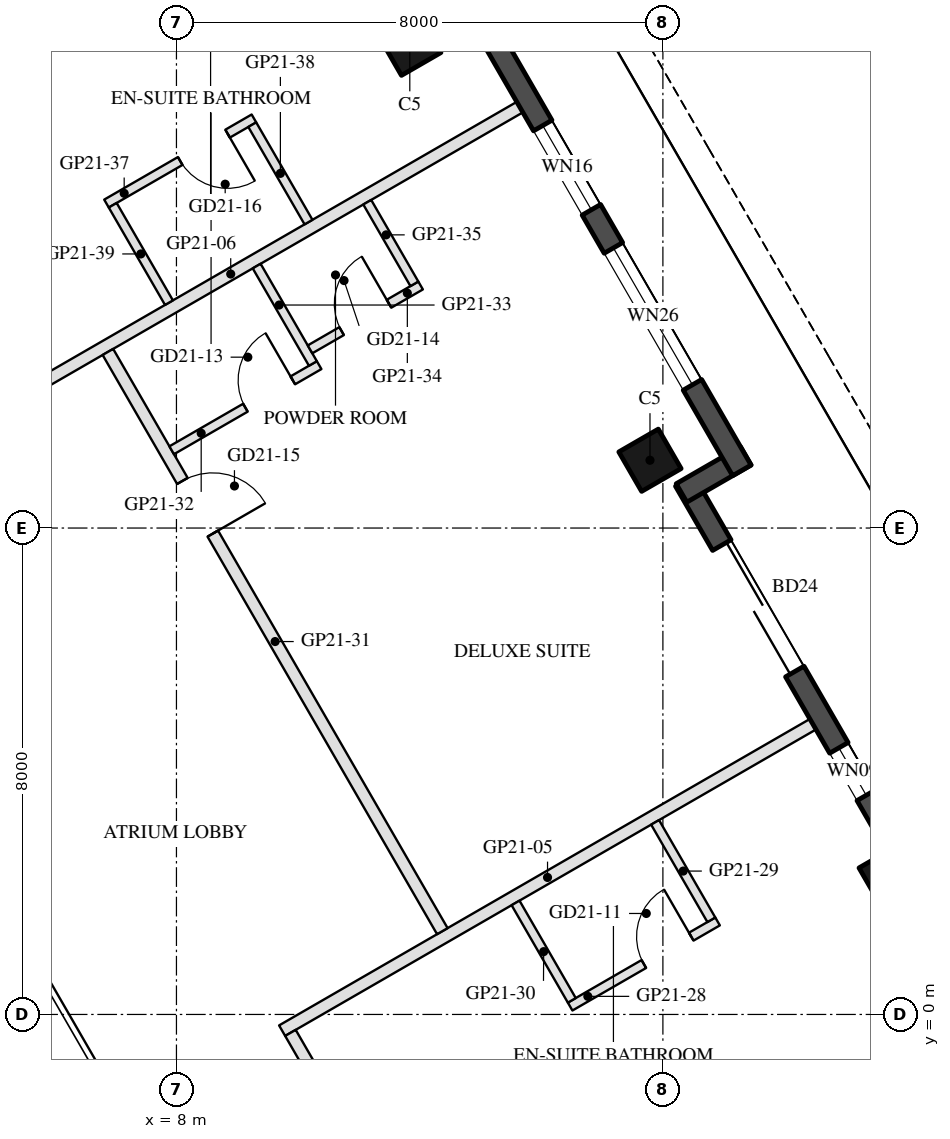
"""IFC4 building model, lengths in metres.
Left out: names, types, materials, properties, quantities, classifications, styles, units other than length and angle.
Written with IfcOpenShell. Run it as: python <this file> out.ifc"""

import sys

from ifc_helpers import new_model, si_unit, direction, frame, frame_2d, origin, origin_2d, place, context, subcontext, project, spatial, rectangle, hollow_rectangle, extrude, element, fill, save


model = new_model("IFC4")
c1 = context("Model", 3, precision=1e-05, world=origin(), true_north=direction((0.0, 1.0)))
c2 = subcontext(c1, "Body", "Model", "MODEL_VIEW")
j1 = project(units=[si_unit("LENGTHUNIT", "METRE"), si_unit("PLANEANGLEUNIT", "RADIAN")], contexts=[c1])
p1 = place(None, origin())
s1 = spatial("IfcSite", under=j1, at=p1, CompositionType="ELEMENT")
p2 = place(p1, origin())
s2 = spatial("IfcBuilding", under=s1, at=p2, CompositionType="ELEMENT")
p3 = place(p2, frame((0.0, 0.0, 220.6)))
s3 = spatial("IfcBuildingStorey", under=s2, at=p3, CompositionType="ELEMENT", Elevation=220.6)
for number, where, z_axis, x_axis in (
    (1, (19.738, 2.273, 0.0), (0.0, 0.0, 1.0), (-0.5, 0.866, 0.0)),
    (2, (15.788, 9.115, 0.0), (0.0, 0.0, 1.0), (-0.5, 0.866, 0.0)),
    (3, (11.838, 15.957, 0.0), (0.0, 0.0, 1.0), (-0.5, 0.866, 0.0)),
):
    element("IfcColumn", number, at=place(p3, frame(where, z_axis=z_axis, x_axis=x_axis)), inside=s3, PredefinedType="COLUMN", context=c2, shape_type="SweptSolid", body=[
        extrude(hollow_rectangle(XDim=0.75, YDim=0.75, WallThickness=0.035, at=origin_2d()), origin(), (0.0, 0.0, 1.0), 3.7),
    ])
p4 = place(p3, frame((19.729, 2.938, 0.0), z_axis=(0.0, 0.0, 1.0), x_axis=(-0.499976430342, 0.866039011305, 0.0)))
e4 = element("IfcWall", 4, at=p4, inside=s3, PredefinedType="SOLIDWALL", context=c2, shape_type="SweptSolid", body=[
    extrude(rectangle(XDim=6.74, YDim=0.35, at=frame_2d((3.37, 0.0))), origin(), (0.0, 0.0, 1.0), 3.55),
])
p5 = place(p4, frame((0.77, 0.0, 0.3)))
e5 = element("IfcOpeningElement", 5, at=p5, cuts=e4, PredefinedType="OPENING", context=c2, shape_type="SweptSolid", body=[
    extrude(rectangle(XDim=0.9, YDim=2.65, at=frame_2d((0.45, 1.325))), frame((0.0, 0.185, 0.0), z_axis=(0.0, -1.0, 0.0), x_axis=(1.0, 0.0, 0.0)), (0.0, 0.0, 1.0), 0.37),
])
p6 = place(p4, frame((3.12, 0.0, 0.0)))
e6 = element("IfcOpeningElement", 6, at=p6, cuts=e4, PredefinedType="OPENING", context=c2, shape_type="SweptSolid", body=[
    extrude(rectangle(XDim=2.4, YDim=2.4, at=frame_2d((1.2, 1.2))), frame((0.0, 0.185, 0.0), z_axis=(0.0, -1.0, 0.0), x_axis=(1.0, 0.0, 0.0)), (0.0, 0.0, 1.0), 0.37),
])
p7 = place(p3, frame((16.306, 8.577, 0.0), z_axis=(0.0, 0.0, 1.0), x_axis=(0.866092288191, 0.499884134912, 0.0)))
e7 = element("IfcWall", 7, at=p7, inside=s3, PredefinedType="SOLIDWALL", context=c2, shape_type="SweptSolid", body=[
    extrude(rectangle(XDim=1.22, YDim=0.35, at=frame_2d((0.61, 0.0))), origin(), (0.0, 0.0, 1.0), 3.55),
])
p8 = place(p3, frame((17.299, 8.948, 0.0), z_axis=(0.0, 0.0, 1.0), x_axis=(-0.500010041276, 0.866019606374, 0.0)))
e8 = element("IfcWall", 8, at=p8, inside=s3, PredefinedType="SOLIDWALL", context=c2, shape_type="SweptSolid", body=[
    extrude(rectangle(XDim=9.7, YDim=0.35, at=frame_2d((4.85, 0.0))), origin(), (0.0, 0.0, 1.0), 3.55),
])
p9 = place(p8, frame((1.625, 0.0, 0.3)))
e9 = element("IfcOpeningElement", 9, at=p9, cuts=e8, PredefinedType="OPENING", context=c2, shape_type="SweptSolid", body=[
    extrude(rectangle(XDim=2.6, YDim=2.65, at=frame_2d((1.3, 1.325))), frame((0.0, 0.185, 0.0), z_axis=(0.0, -1.0, 0.0), x_axis=(1.0, 0.0, 0.0)), (0.0, 0.0, 1.0), 0.37),
])
p10 = place(p8, frame((4.949, 0.0, 0.3)))
e10 = element("IfcOpeningElement", 10, at=p10, cuts=e8, PredefinedType="OPENING", context=c2, shape_type="SweptSolid", body=[
    extrude(rectangle(XDim=1.6, YDim=2.65, at=frame_2d((0.8, 1.325))), frame((0.0, 0.185, 0.0), z_axis=(0.0, -1.0, 0.0), x_axis=(1.0, 0.0, 0.0)), (0.0, 0.0, 1.0), 0.37),
])
p11 = place(p3, frame((18.468, 4.773, 0.0), z_axis=(0.0, 0.0, 1.0), x_axis=(-0.866033125095, -0.499986626058, 0.0)))
e11 = element("IfcWall", 11, at=p11, inside=s3, PredefinedType="PARTITIONING", context=c2, shape_type="SweptSolid", body=[
    extrude(rectangle(XDim=10.08, YDim=0.2, at=frame_2d((5.04, 0.0))), origin(), (0.0, 0.0, 1.0), 3.06),
])
p12 = place(p3, frame((13.647, 14.923, 0.0), z_axis=(0.0, 0.0, 1.0), x_axis=(-0.866027479907, -0.499996404033, 0.0)))
e12 = element("IfcWall", 12, at=p12, inside=s3, PredefinedType="PARTITIONING", context=c2, shape_type="SweptSolid", body=[
    extrude(rectangle(XDim=10.98, YDim=0.2, at=frame_2d((5.49, 0.0))), origin(), (0.0, 0.0, 1.0), 3.06),
])
p13 = place(p3, frame((9.875, -0.303, 0.0), z_axis=(0.0, 0.0, 1.0), x_axis=(0.500026984917, -0.866009823475, 0.0)))
e13 = element("IfcWall", 13, at=p13, inside=s3, PredefinedType="PARTITIONING", context=c2, shape_type="SweptSolid", body=[
    extrude(rectangle(XDim=4.788, YDim=0.2, at=frame_2d((2.394, 0.0))), origin(), (0.0, 0.0, 1.0), 2.95),
])
p14 = place(p13, frame((1.894, 0.0, 0.0)))
e14 = element("IfcOpeningElement", 14, at=p14, cuts=e13, PredefinedType="OPENING", context=c2, shape_type="SweptSolid", body=[
    extrude(rectangle(XDim=1.0, YDim=2.1, at=frame_2d((0.5, 1.05))), frame((0.0, 0.11, 0.0), z_axis=(0.0, -1.0, 0.0), x_axis=(1.0, 0.0, 0.0)), (0.0, 0.0, 1.0), 0.22),
])
p15 = place(p3, frame((14.474, 0.13, 0.0), z_axis=(0.0, 0.0, 1.0), x_axis=(0.866056369097, 0.49994636267, 0.0)))
e15 = element("IfcWall", 15, at=p15, inside=s3, PredefinedType="PARTITIONING", context=c2, shape_type="SweptSolid", body=[
    extrude(rectangle(XDim=2.8, YDim=0.15, at=frame_2d((1.4, 0.0))), origin(), (0.0, 0.0, 1.0), 3.55),
])
p16 = place(p15, frame((1.4, 0.0, 0.0)))
e16 = element("IfcOpeningElement", 16, at=p16, cuts=e15, PredefinedType="OPENING", context=c2, shape_type="SweptSolid", body=[
    extrude(rectangle(XDim=0.9, YDim=2.1, at=frame_2d((0.45, 1.05))), frame((0.0, 0.085, 0.0), z_axis=(0.0, -1.0, 0.0), x_axis=(1.0, 0.0, 0.0)), (0.0, 0.0, 1.0), 0.17),
])
for number, where, z_axis, x_axis in (
    (17, (16.797, 1.557, 0.0), (0.0, 0.0, 1.0), (-0.5, 0.866, 0.0)),
    (18, (14.502, 0.232, 0.0), (0.0, 0.0, 1.0), (-0.5, 0.866, 0.0)),
):
    element("IfcWall", number, at=place(p3, frame(where, z_axis=z_axis, x_axis=x_axis)), inside=s3, PredefinedType="PARTITIONING", context=c2, shape_type="SweptSolid", body=[
        extrude(rectangle(XDim=1.85, YDim=0.15, at=frame_2d((0.925, 0.0))), origin(), (0.0, 0.0, 1.0), 3.55),
    ])
p17 = place(p3, frame((6.873, 10.896, 0.0), z_axis=(0.0, 0.0, 1.0), x_axis=(0.499996545922, -0.866027397988, 0.0)))
e19 = element("IfcWall", 19, at=p17, inside=s3, PredefinedType="PARTITIONING", context=c2, shape_type="SweptSolid", body=[
    extrude(rectangle(XDim=11.0, YDim=0.2, at=frame_2d((5.5, 0.0))), origin(), (0.0, 0.0, 1.0), 2.95),
])
p18 = place(p17, frame((2.45, 0.0, 0.0)))
e20 = element("IfcOpeningElement", 20, at=p18, cuts=e19, PredefinedType="OPENING", context=c2, shape_type="SweptSolid", body=[
    extrude(rectangle(XDim=1.0, YDim=2.1, at=frame_2d((0.5, 1.05))), frame((0.0, 0.11, 0.0), z_axis=(0.0, -1.0, 0.0), x_axis=(1.0, 0.0, 0.0)), (0.0, 0.0, 1.0), 0.22),
])
p19 = place(p3, frame((7.922, 9.279, 0.0), z_axis=(0.0, 0.0, 1.0), x_axis=(0.865996816683, 0.500049511043, 0.0)))
e21 = element("IfcWall", 21, at=p19, inside=s3, PredefinedType="PARTITIONING", context=c2, shape_type="SweptSolid", body=[
    extrude(rectangle(XDim=2.8, YDim=0.15, at=frame_2d((1.4, 0.0))), origin(), (0.0, 0.0, 1.0), 2.95),
])
p20 = place(p19, frame((1.4, 0.0, 0.0)))
e22 = element("IfcOpeningElement", 22, at=p20, cuts=e21, PredefinedType="OPENING", context=c2, shape_type="SweptSolid", body=[
    extrude(rectangle(XDim=0.9, YDim=2.1, at=frame_2d((0.45, 1.05))), frame((0.0, 0.085, 0.0), z_axis=(0.0, -1.0, 0.0), x_axis=(1.0, 0.0, 0.0)), (0.0, 0.0, 1.0), 0.17),
])
p21 = place(p3, frame((10.244, 10.707, 0.0), z_axis=(0.0, 0.0, 1.0), x_axis=(-0.500042316284, 0.866000971088, 0.0)))
e23 = element("IfcWall", 23, at=p21, inside=s3, PredefinedType="PARTITIONING", context=c2, shape_type="SweptSolid", body=[
    extrude(rectangle(XDim=1.85, YDim=0.15, at=frame_2d((0.925, 0.0))), origin(), (0.0, 0.0, 1.0), 3.55),
])
p22 = place(p3, frame((10.197, 10.939, 0.0), z_axis=(0.0, 0.0, 1.0), x_axis=(0.866009402589, 0.500027713859, 0.0)))
e24 = element("IfcWall", 24, at=p22, inside=s3, PredefinedType="PARTITIONING", context=c2, shape_type="SweptSolid", body=[
    extrude(rectangle(XDim=2.1, YDim=0.15, at=frame_2d((1.05, 0.0))), origin(), (0.0, 0.0, 1.0), 3.55),
])
p23 = place(p22, frame((0.6, 0.0, 0.0)))
e25 = element("IfcOpeningElement", 25, at=p23, cuts=e24, PredefinedType="OPENING", context=c2, shape_type="SweptSolid", body=[
    extrude(rectangle(XDim=0.9, YDim=2.1, at=frame_2d((0.45, 1.05))), frame((0.0, 0.085, 0.0), z_axis=(0.0, -1.0, 0.0), x_axis=(1.0, 0.0, 0.0)), (0.0, 0.0, 1.0), 0.17),
])
p24 = place(p3, frame((11.913, 12.016, 0.0), z_axis=(0.0, 0.0, 1.0), x_axis=(-0.499967891604, 0.866043940782, 0.0)))
e26 = element("IfcWall", 26, at=p24, inside=s3, PredefinedType="PARTITIONING", context=c2, shape_type="SweptSolid", body=[
    extrude(rectangle(XDim=1.55, YDim=0.15, at=frame_2d((0.775, 0.0))), origin(), (0.0, 0.0, 1.0), 3.55),
])
p25 = place(p3, frame((9.274, 14.737, 0.0), z_axis=(0.0, 0.0, 1.0), x_axis=(-0.866018616679, -0.500011755427, 0.0)))
e27 = element("IfcWall", 27, at=p25, inside=s3, PredefinedType="PARTITIONING", context=c2, shape_type="SweptSolid", body=[
    extrude(rectangle(XDim=2.8, YDim=0.15, at=frame_2d((1.4, 0.0))), origin(), (0.0, 0.0, 1.0), 3.55),
])
p26 = place(p25, frame((0.5, 0.0, 0.0)))
e28 = element("IfcOpeningElement", 28, at=p26, cuts=e27, PredefinedType="OPENING", context=c2, shape_type="SweptSolid", body=[
    extrude(rectangle(XDim=0.9, YDim=2.1, at=frame_2d((0.45, 1.05))), frame((0.0, 0.085, 0.0), z_axis=(0.0, -1.0, 0.0), x_axis=(1.0, 0.0, 0.0)), (0.0, 0.0, 1.0), 0.17),
])
p27 = place(p3, frame((10.172, 13.032, 0.0), z_axis=(0.0, 0.0, 1.0), x_axis=(-0.500042316284, 0.866000971088, 0.0)))
e29 = element("IfcWall", 29, at=p27, inside=s3, PredefinedType="PARTITIONING", context=c2, shape_type="SweptSolid", body=[
    extrude(rectangle(XDim=1.85, YDim=0.15, at=frame_2d((0.925, 0.0))), origin(), (0.0, 0.0, 1.0), 2.95),
])
p28 = place(p3, frame((7.877, 11.707, 0.0), z_axis=(0.0, 0.0, 1.0), x_axis=(-0.499985172903, 0.866033964044, 0.0)))
e30 = element("IfcWall", 30, at=p28, inside=s3, PredefinedType="PARTITIONING", context=c2, shape_type="SweptSolid", body=[
    extrude(rectangle(XDim=1.85, YDim=0.15, at=frame_2d((0.925, 0.0))), origin(), (0.0, 0.0, 1.0), 2.95),
])
p29 = place(p5, origin())
e31 = element("IfcWindow", 31, at=p29, inside=s3, PartitioningType="SINGLE_PANEL", PredefinedType="WINDOW", context=c2, shape_type="SweptSolid", body=[
    extrude(rectangle(XDim=0.9, YDim=2.65, at=frame_2d((0.45, 1.325))), frame((0.0, 0.03, 0.0), z_axis=(0.0, -1.0, 0.0), x_axis=(1.0, 0.0, 0.0)), (0.0, 0.0, 1.0), 0.06),
])
fill(e5, e31)
p30 = place(p6, frame((2.4, 0.0, 0.0), z_axis=(0.0, 0.0, 1.0), x_axis=(-1.0, 0.0, 0.0)))
e32 = element("IfcDoor", 32, at=p30, inside=s3, OperationType="SLIDING_TO_LEFT", PredefinedType="DOOR", context=c2, shape_type="SweptSolid", body=[
    extrude(rectangle(XDim=2.4, YDim=2.4, at=frame_2d((1.2, 1.2))), frame((0.0, 0.025, 0.0), z_axis=(0.0, -1.0, 0.0), x_axis=(1.0, 0.0, 0.0)), (0.0, 0.0, 1.0), 0.05),
])
fill(e6, e32)
p31 = place(p9, origin())
e33 = element("IfcWindow", 33, at=p31, inside=s3, PartitioningType="SINGLE_PANEL", PredefinedType="WINDOW", context=c2, shape_type="SweptSolid", body=[
    extrude(rectangle(XDim=2.6, YDim=2.65, at=frame_2d((1.3, 1.325))), frame((0.0, 0.03, 0.0), z_axis=(0.0, -1.0, 0.0), x_axis=(1.0, 0.0, 0.0)), (0.0, 0.0, 1.0), 0.06),
])
fill(e9, e33)
p32 = place(p10, origin())
e34 = element("IfcWindow", 34, at=p32, inside=s3, PartitioningType="SINGLE_PANEL", PredefinedType="WINDOW", context=c2, shape_type="SweptSolid", body=[
    extrude(rectangle(XDim=1.6, YDim=2.65, at=frame_2d((0.8, 1.325))), frame((0.0, 0.03, 0.0), z_axis=(0.0, -1.0, 0.0), x_axis=(1.0, 0.0, 0.0)), (0.0, 0.0, 1.0), 0.06),
])
fill(e10, e34)
p33 = place(p16, origin())
e35 = element("IfcDoor", 35, at=p33, inside=s3, OperationType="SINGLE_SWING_RIGHT", PredefinedType="DOOR", context=c2, shape_type="SweptSolid", body=[
    extrude(rectangle(XDim=0.9, YDim=2.1, at=frame_2d((0.45, 1.05))), frame((0.0, 0.025, 0.0), z_axis=(0.0, -1.0, 0.0), x_axis=(1.0, 0.0, 0.0)), (0.0, 0.0, 1.0), 0.05),
])
fill(e16, e35)
p34 = place(p20, origin())
e36 = element("IfcDoor", 36, at=p34, inside=s3, OperationType="SINGLE_SWING_RIGHT", PredefinedType="DOOR", context=c2, shape_type="SweptSolid", body=[
    extrude(rectangle(XDim=0.9, YDim=2.1, at=frame_2d((0.45, 1.05))), frame((0.0, 0.025, 0.0), z_axis=(0.0, -1.0, 0.0), x_axis=(1.0, 0.0, 0.0)), (0.0, 0.0, 1.0), 0.05),
])
fill(e22, e36)
p35 = place(p23, origin())
e37 = element("IfcDoor", 37, at=p35, inside=s3, OperationType="SINGLE_SWING_RIGHT", PredefinedType="DOOR", context=c2, shape_type="SweptSolid", body=[
    extrude(rectangle(XDim=0.9, YDim=2.1, at=frame_2d((0.45, 1.05))), frame((0.0, 0.025, 0.0), z_axis=(0.0, -1.0, 0.0), x_axis=(1.0, 0.0, 0.0)), (0.0, 0.0, 1.0), 0.05),
])
fill(e25, e37)
p36 = place(p18, origin())
e38 = element("IfcDoor", 38, at=p36, inside=s3, OperationType="SINGLE_SWING_RIGHT", PredefinedType="DOOR", context=c2, shape_type="SweptSolid", body=[
    extrude(rectangle(XDim=1.0, YDim=2.1, at=frame_2d((0.5, 1.05))), frame((0.0, 0.025, 0.0), z_axis=(0.0, -1.0, 0.0), x_axis=(1.0, 0.0, 0.0)), (0.0, 0.0, 1.0), 0.05),
])
fill(e20, e38)
p37 = place(p26, origin())
e39 = element("IfcDoor", 39, at=p37, inside=s3, OperationType="SINGLE_SWING_LEFT", PredefinedType="DOOR", context=c2, shape_type="SweptSolid", body=[
    extrude(rectangle(XDim=0.9, YDim=2.1, at=frame_2d((0.45, 1.05))), frame((0.0, 0.025, 0.0), z_axis=(0.0, -1.0, 0.0), x_axis=(1.0, 0.0, 0.0)), (0.0, 0.0, 1.0), 0.05),
])
fill(e28, e39)
save(model, sys.argv[1])
